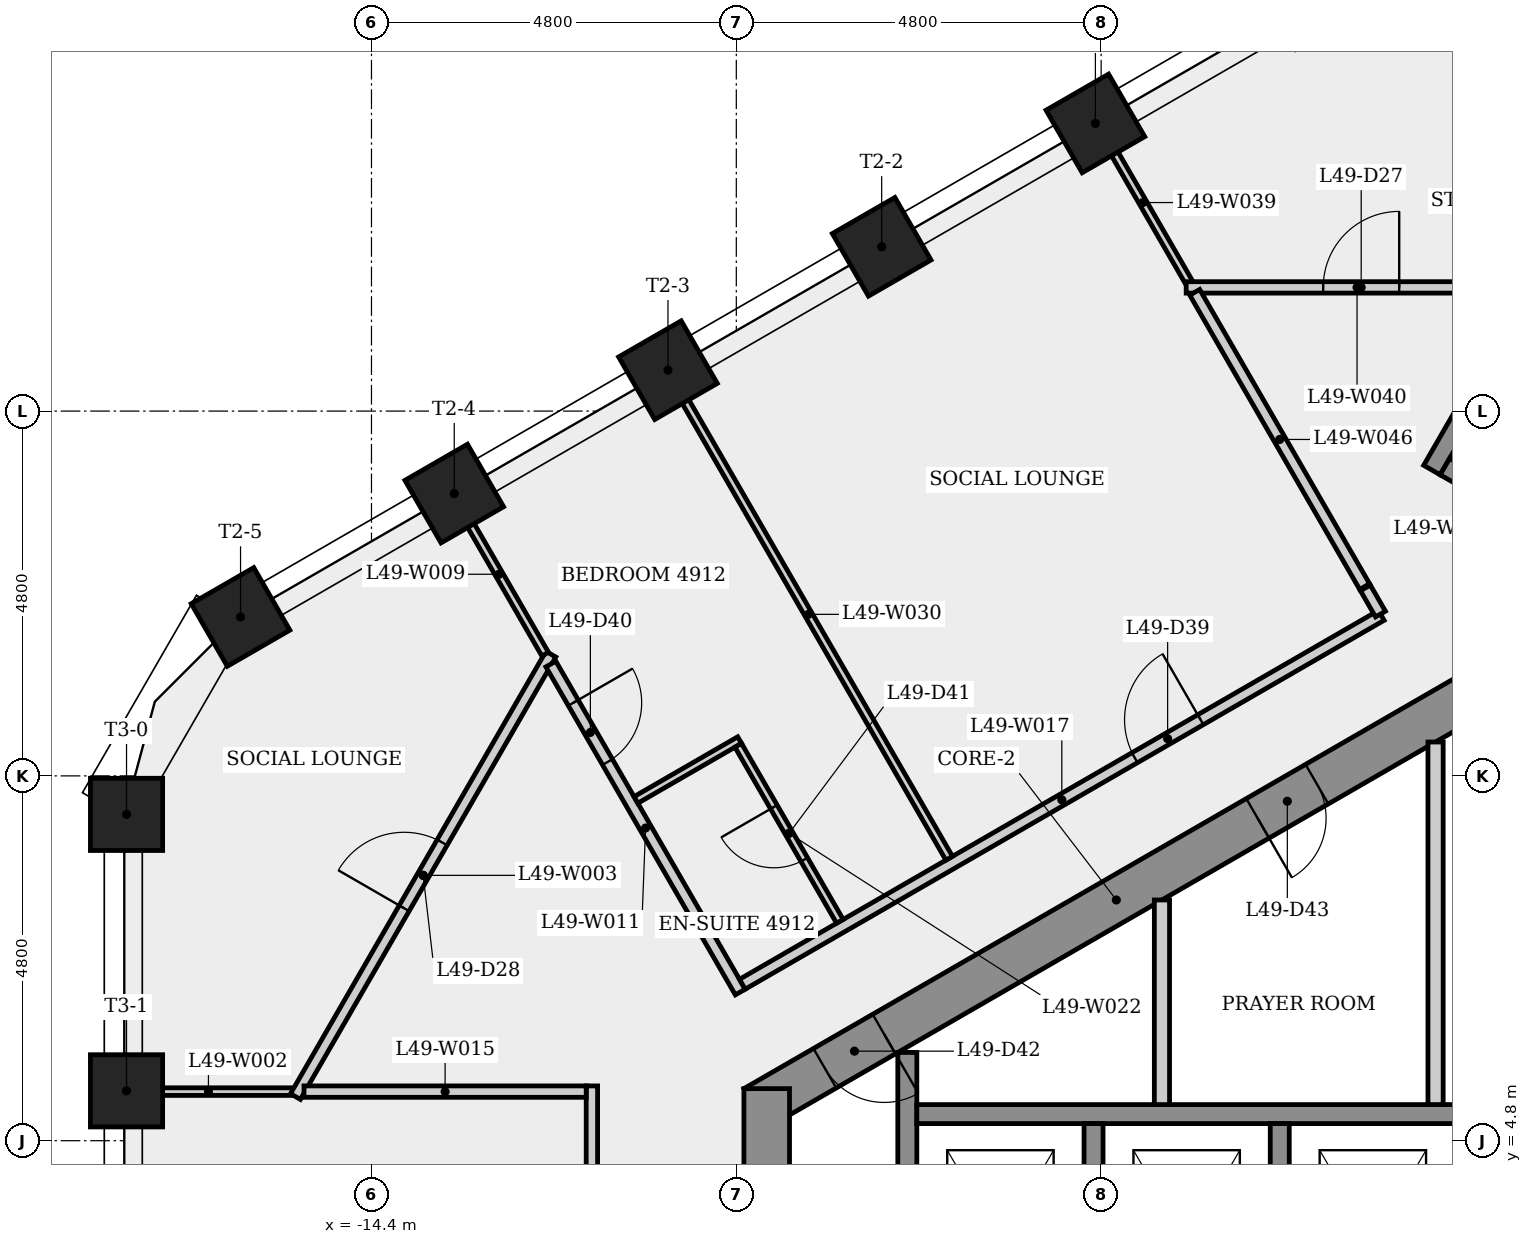
"""IFC4 building model, lengths in metres.
Left out: names, types, materials, properties, quantities, classifications, styles, units other than length and angle.
Written with IfcOpenShell. Run it as: python <this file> out.ifc"""

import sys

from ifc_helpers import new_model, si_unit, direction, frame, frame_2d, origin, origin_2d, place, context, subcontext, project, spatial, rectangle, extrude, element, fill, save


model = new_model("IFC4")
c1 = context("Model", 3, precision=1e-05, world=origin(), true_north=direction((0.0, 1.0)))
c2 = subcontext(c1, "Body", "Model", "MODEL_VIEW")
j1 = project(units=[si_unit("LENGTHUNIT", "METRE"), si_unit("PLANEANGLEUNIT", "RADIAN")], contexts=[c1])
p1 = place(None, origin())
s1 = spatial("IfcSite", under=j1, at=p1, CompositionType="ELEMENT")
p2 = place(p1, origin())
s2 = spatial("IfcBuilding", under=s1, at=p2, CompositionType="ELEMENT")
p3 = place(p2, frame((0.0, 0.0, 183.3)))
s3 = spatial("IfcBuildingStorey", under=s2, at=p3, CompositionType="ELEMENT", Elevation=183.3)
p4 = place(p3, frame((9.35, 5.225, 0.0), z_axis=(0.0, 0.0, 1.0), x_axis=(-0.866023993627, 0.500002442456, 0.0)))
e1 = element("IfcWall", 1, at=p4, inside=s3, PredefinedType="SHEAR", context=c2, shape_type="SweptSolid", body=[
    extrude(rectangle(XDim=10.97, YDim=0.6, at=frame_2d((5.485, 0.0))), origin(), (0.0, 0.0, 1.0), 3.4),
])
p5 = place(p4, frame((8.325, 0.0, 0.0)))
e2 = element("IfcOpeningElement", 2, at=p5, cuts=e1, PredefinedType="OPENING", context=c2, shape_type="SweptSolid", body=[
    extrude(rectangle(XDim=0.9, YDim=2.1, at=frame_2d((0.45, 1.05))), frame((0.0, 0.31, 0.0), z_axis=(0.0, -1.0, 0.0), x_axis=(1.0, 0.0, 0.0)), (0.0, 0.0, 1.0), 0.62),
])
p6 = place(p4, frame((1.518, 0.0, 0.0)))
e3 = element("IfcOpeningElement", 3, at=p6, cuts=e1, PredefinedType="OPENING", context=c2, shape_type="SweptSolid", body=[
    extrude(rectangle(XDim=0.9, YDim=2.1, at=frame_2d((0.45, 1.05))), frame((0.0, 0.31, 0.0), z_axis=(0.0, -1.0, 0.0), x_axis=(1.0, 0.0, 0.0)), (0.0, 0.0, 1.0), 0.62),
])
p7 = place(p3, frame((0.15, 10.71, 0.0), z_axis=(0.0, 0.0, 1.0), x_axis=(-0.866023993627, -0.500002442456, 0.0)))
e4 = element("IfcWall", 4, at=p7, inside=s3, PredefinedType="SHEAR", context=c2, shape_type="SweptSolid", body=[
    extrude(rectangle(XDim=10.97, YDim=0.6, at=frame_2d((5.485, 0.0))), origin(), (0.0, 0.0, 1.0), 3.4),
])
p8 = place(p7, frame((9.013, 0.0, 0.0)))
e5 = element("IfcOpeningElement", 5, at=p8, cuts=e4, PredefinedType="OPENING", context=c2, shape_type="SweptSolid", body=[
    extrude(rectangle(XDim=0.9, YDim=2.1, at=frame_2d((0.45, 1.05))), frame((0.0, 0.31, 0.0), z_axis=(0.0, -1.0, 0.0), x_axis=(1.0, 0.0, 0.0)), (0.0, 0.0, 1.0), 0.62),
])
p9 = place(p7, frame((2.437, 0.0, 0.0)))
e6 = element("IfcOpeningElement", 6, at=p9, cuts=e4, PredefinedType="OPENING", context=c2, shape_type="SweptSolid", body=[
    extrude(rectangle(XDim=0.9, YDim=2.1, at=frame_2d((0.45, 1.05))), frame((0.0, 0.31, 0.0), z_axis=(0.0, -1.0, 0.0), x_axis=(1.0, 0.0, 0.0)), (0.0, 0.0, 1.0), 0.62),
])
p10 = place(p3, frame((-9.2, 5.485, 0.0), z_axis=(0.0, 0.0, 1.0), x_axis=(0.0, -1.0, 0.0)))
e7 = element("IfcWall", 7, at=p10, inside=s3, PredefinedType="SHEAR", context=c2, shape_type="SweptSolid", body=[
    extrude(rectangle(XDim=10.97, YDim=0.6, at=frame_2d((5.485, 0.0))), origin(), (0.0, 0.0, 1.0), 3.4),
])
p11 = place(p10, frame((8.516, 0.0, 0.0)))
e8 = element("IfcOpeningElement", 8, at=p11, cuts=e7, PredefinedType="OPENING", context=c2, shape_type="SweptSolid", body=[
    extrude(rectangle(XDim=0.9, YDim=2.1, at=frame_2d((0.45, 1.05))), frame((0.0, 0.31, 0.0), z_axis=(0.0, -1.0, 0.0), x_axis=(1.0, 0.0, 0.0)), (0.0, 0.0, 1.0), 0.62),
])
p12 = place(p10, frame((4.685, 0.0, 0.0)))
e9 = element("IfcOpeningElement", 9, at=p12, cuts=e7, PredefinedType="OPENING", context=c2, shape_type="SweptSolid", body=[
    extrude(rectangle(XDim=1.6, YDim=2.1, at=frame_2d((0.8, 1.05))), frame((0.0, 0.31, 0.0), z_axis=(0.0, -1.0, 0.0), x_axis=(1.0, 0.0, 0.0)), (0.0, 0.0, 1.0), 0.62),
])
for number, where, z_axis, x_axis in (
    (10, (-4.875, 18.185, 0.0), (0.0, 0.0, 1.0), (-0.5, 0.866, 0.0)),
    (11, (-7.687, 16.562, 0.0), (0.0, 0.0, 1.0), (-0.5, 0.866, 0.0)),
    (12, (-10.499, 14.938, 0.0), (0.0, 0.0, 1.0), (-0.5, 0.866, 0.0)),
    (13, (-13.311, 13.315, 0.0), (0.0, 0.0, 1.0), (-0.5, 0.866, 0.0)),
    (14, (-16.123, 11.692, 0.0), (0.0, 0.0, 1.0), (-0.5, 0.866, 0.0)),
    (15, (-17.623, 9.094, 0.0), (0.0, 0.0, 1.0), (-1.0, 0.0, 0.0)),
    (16, (-17.623, 5.456, 0.0), (0.0, 0.0, 1.0), (-1.0, 0.0, 0.0)),
):
    element("IfcColumn", number, at=place(p3, frame(where, z_axis=z_axis, x_axis=x_axis)), inside=s3, PredefinedType="COLUMN", context=c2, shape_type="SweptSolid", body=[
        extrude(rectangle(XDim=0.95, YDim=0.95, at=origin_2d()), origin(), (0.0, 0.0, 1.0), 3.4),
    ])
p13 = place(p3, frame((-15.438, 5.446, 0.0), z_axis=(0.0, 0.0, 1.0), x_axis=(-1.0, 0.0, 0.0)))
e17 = element("IfcWall", 17, at=p13, inside=s3, PredefinedType="PARTITIONING", context=c2, shape_type="SweptSolid", body=[
    extrude(rectangle(XDim=2.214, YDim=0.1, at=frame_2d((1.107, 0.0))), origin(), (0.0, 0.0, 1.0), 3.0),
])
p14 = place(p3, frame((-15.4, 5.381, 0.0), z_axis=(0.0, 0.0, 1.0), x_axis=(0.49997922879, 0.866037395716, 0.0)))
e18 = element("IfcWall", 18, at=p14, inside=s3, PredefinedType="PARTITIONING", context=c2, shape_type="SweptSolid", body=[
    extrude(rectangle(XDim=6.721, YDim=0.15, at=frame_2d((3.361, 0.0))), origin(), (0.0, 0.0, 1.0), 3.0),
])
p15 = place(p14, frame((2.861, 0.0, 0.0)))
e19 = element("IfcOpeningElement", 19, at=p15, cuts=e18, PredefinedType="OPENING", context=c2, shape_type="SweptSolid", body=[
    extrude(rectangle(XDim=1.0, YDim=2.1, at=frame_2d((0.5, 1.05))), frame((0.0, 0.085, 0.0), z_axis=(0.0, -1.0, 0.0), x_axis=(1.0, 0.0, 0.0)), (0.0, 0.0, 1.0), 0.17),
])
p16 = place(p3, frame((-13.329, 13.305, 0.0), z_axis=(0.0, 0.0, 1.0), x_axis=(0.500021275498, -0.866013120021, 0.0)))
e20 = element("IfcWall", 20, at=p16, inside=s3, PredefinedType="PARTITIONING", context=c2, shape_type="SweptSolid", body=[
    extrude(rectangle(XDim=2.428, YDim=0.1, at=frame_2d((1.214, 0.0))), origin(), (0.0, 0.0, 1.0), 3.0),
])
p17 = place(p3, frame((-12.04, 11.072, 0.0), z_axis=(0.0, 0.0, 1.0), x_axis=(0.499985374448, -0.866033847686, 0.0)))
e21 = element("IfcWall", 21, at=p17, inside=s3, PredefinedType="PARTITIONING", context=c2, shape_type="SweptSolid", body=[
    extrude(rectangle(XDim=4.984, YDim=0.15, at=frame_2d((2.492, 0.0))), origin(), (0.0, 0.0, 1.0), 3.0),
])
p18 = place(p17, frame((0.589, 0.0, 0.0)))
e22 = element("IfcOpeningElement", 22, at=p18, cuts=e21, PredefinedType="OPENING", context=c2, shape_type="SweptSolid", body=[
    extrude(rectangle(XDim=0.9, YDim=2.1, at=frame_2d((0.45, 1.05))), frame((0.0, 0.085, 0.0), z_axis=(0.0, -1.0, 0.0), x_axis=(1.0, 0.0, 0.0)), (0.0, 0.0, 1.0), 0.17),
])
p19 = place(p3, frame((-11.5, -5.371, 0.0), z_axis=(0.0, 0.0, 1.0), x_axis=(0.0, 1.0, 0.0)))
e23 = element("IfcWall", 23, at=p19, inside=s3, PredefinedType="PARTITIONING", context=c2, shape_type="SweptSolid", body=[
    extrude(rectangle(XDim=10.892, YDim=0.15, at=frame_2d((5.446, 0.0))), origin(), (0.0, 0.0, 1.0), 3.0),
])
p20 = place(p19, frame((6.686, 0.0, 0.0)))
e24 = element("IfcOpeningElement", 24, at=p20, cuts=e23, PredefinedType="OPENING", context=c2, shape_type="SweptSolid", body=[
    extrude(rectangle(XDim=1.0, YDim=2.1, at=frame_2d((0.5, 1.05))), frame((0.0, 0.085, 0.0), z_axis=(0.0, -1.0, 0.0), x_axis=(1.0, 0.0, 0.0)), (0.0, 0.0, 1.0), 0.17),
])
p21 = place(p19, frame((2.256, 0.0, 0.0)))
e25 = element("IfcOpeningElement", 25, at=p21, cuts=e23, PredefinedType="OPENING", context=c2, shape_type="SweptSolid", body=[
    extrude(rectangle(XDim=0.9, YDim=2.1, at=frame_2d((0.45, 1.05))), frame((0.0, 0.085, 0.0), z_axis=(0.0, -1.0, 0.0), x_axis=(1.0, 0.0, 0.0)), (0.0, 0.0, 1.0), 0.17),
])
p22 = place(p3, frame((-11.575, 5.446, 0.0), z_axis=(0.0, 0.0, 1.0), x_axis=(-1.0, 0.0, 0.0)))
e26 = element("IfcWall", 26, at=p22, inside=s3, PredefinedType="PARTITIONING", context=c2, shape_type="SweptSolid", body=[
    extrude(rectangle(XDim=3.713, YDim=0.15, at=frame_2d((1.856, 0.0))), origin(), (0.0, 0.0, 1.0), 3.0),
])
p23 = place(p3, frame((-9.556, 10.071, 0.0), z_axis=(0.0, 0.0, 1.0), x_axis=(-0.866002311072, -0.500039995618, 0.0)))
e27 = element("IfcWall", 27, at=p23, inside=s3, PredefinedType="PARTITIONING", context=c2, shape_type="SweptSolid", body=[
    extrude(rectangle(XDim=1.575, YDim=0.1, at=frame_2d((0.788, 0.0))), origin(), (0.0, 0.0, 1.0), 3.0),
])
p24 = place(p3, frame((-9.521, 6.859, 0.0), z_axis=(0.0, 0.0, 1.0), x_axis=(0.866022649559, 0.500004770428, 0.0)))
e28 = element("IfcWall", 28, at=p24, inside=s3, PredefinedType="PARTITIONING", context=c2, shape_type="SweptSolid", body=[
    extrude(rectangle(XDim=9.707, YDim=0.15, at=frame_2d((4.853, 0.0))), origin(), (0.0, 0.0, 1.0), 3.0),
])
p25 = place(p24, frame((5.961, 0.0, 0.0)))
e29 = element("IfcOpeningElement", 29, at=p25, cuts=e28, PredefinedType="OPENING", context=c2, shape_type="SweptSolid", body=[
    extrude(rectangle(XDim=1.0, YDim=2.1, at=frame_2d((0.5, 1.05))), frame((0.0, 0.085, 0.0), z_axis=(0.0, -1.0, 0.0), x_axis=(1.0, 0.0, 0.0)), (0.0, 0.0, 1.0), 0.17),
])
p26 = place(p3, frame((-8.237, 7.686, 0.0), z_axis=(0.0, 0.0, 1.0), x_axis=(-0.499967368674, 0.86604424267, 0.0)))
e30 = element("IfcWall", 30, at=p26, inside=s3, PredefinedType="PARTITIONING", context=c2, shape_type="SweptSolid", body=[
    extrude(rectangle(XDim=2.675, YDim=0.1, at=frame_2d((1.337, 0.0))), origin(), (0.0, 0.0, 1.0), 3.0),
])
p27 = place(p26, frame((0.938, 0.0, 0.0)))
e31 = element("IfcOpeningElement", 31, at=p27, cuts=e30, PredefinedType="OPENING", context=c2, shape_type="SweptSolid", body=[
    extrude(rectangle(XDim=0.8, YDim=2.1, at=frame_2d((0.4, 1.05))), frame((0.0, 0.06, 0.0), z_axis=(0.0, -1.0, 0.0), x_axis=(1.0, 0.0, 0.0)), (0.0, 0.0, 1.0), 0.12),
])
p28 = place(p3, frame((-7.35, 1.925, 0.0), z_axis=(0.0, 0.0, 1.0), x_axis=(0.0, 1.0, 0.0)))
e32 = element("IfcWall", 32, at=p28, inside=s3, PredefinedType="SHEAR", context=c2, shape_type="SweptSolid", body=[
    extrude(rectangle(XDim=4.036, YDim=0.25, at=frame_2d((2.018, 0.0))), origin(), (0.0, 0.0, 1.0), 3.0),
])
p29 = place(p3, frame((-7.225, 5.15, 0.0), z_axis=(0.0, 0.0, 1.0), x_axis=(1.0, 0.0, 0.0)))
e33 = element("IfcWall", 33, at=p29, inside=s3, PredefinedType="SHEAR", context=c2, shape_type="SweptSolid", body=[
    extrude(rectangle(XDim=14.7, YDim=0.25, at=frame_2d((7.35, 0.0))), origin(), (0.0, 0.0, 1.0), 3.0),
])
p30 = place(p3, frame((-6.799, 8.516, 0.0), z_axis=(0.0, 0.0, 1.0), x_axis=(-0.500011399757, 0.866018822032, 0.0)))
e34 = element("IfcWall", 34, at=p30, inside=s3, PredefinedType="PARTITIONING", context=c2, shape_type="SweptSolid", body=[
    extrude(rectangle(XDim=7.411, YDim=0.1, at=frame_2d((3.706, 0.0))), origin(), (0.0, 0.0, 1.0), 3.0),
])
p31 = place(p3, frame((-4.9, 5.025, 0.0), z_axis=(0.0, 0.0, 1.0), x_axis=(0.0, -1.0, 0.0)))
e35 = element("IfcWall", 35, at=p31, inside=s3, PredefinedType="SHEAR", context=c2, shape_type="SweptSolid", body=[
    extrude(rectangle(XDim=3.1, YDim=0.25, at=frame_2d((1.55, 0.0))), origin(), (0.0, 0.0, 1.0), 3.4),
])
p32 = place(p3, frame((-4.0, 7.967, 0.0), z_axis=(0.0, 0.0, 1.0), x_axis=(0.0, -1.0, 0.0)))
e36 = element("IfcWall", 36, at=p32, inside=s3, PredefinedType="PARTITIONING", context=c2, shape_type="SweptSolid", body=[
    extrude(rectangle(XDim=2.692, YDim=0.2, at=frame_2d((1.346, 0.0))), origin(), (0.0, 0.0, 1.0), 3.0),
])
p33 = place(p3, frame((-3.644, 16.093, 0.0), z_axis=(0.0, 0.0, 1.0), x_axis=(-0.500021275498, 0.866013120021, 0.0)))
e37 = element("IfcWall", 37, at=p33, inside=s3, PredefinedType="PARTITIONING", context=c2, shape_type="SweptSolid", body=[
    extrude(rectangle(XDim=2.428, YDim=0.1, at=frame_2d((1.214, 0.0))), origin(), (0.0, 0.0, 1.0), 3.0),
])
p34 = place(p3, frame((-3.681, 16.028, 0.0), z_axis=(0.0, 0.0, 1.0), x_axis=(1.0, 0.0, 0.0)))
e38 = element("IfcWall", 38, at=p34, inside=s3, PredefinedType="PARTITIONING", context=c2, shape_type="SweptSolid", body=[
    extrude(rectangle(XDim=4.496, YDim=0.15, at=frame_2d((2.248, 0.0))), origin(), (0.0, 0.0, 1.0), 3.0),
])
p35 = place(p34, frame((1.803, 0.0, 0.0)))
e39 = element("IfcOpeningElement", 39, at=p35, cuts=e38, PredefinedType="OPENING", context=c2, shape_type="SweptSolid", body=[
    extrude(rectangle(XDim=1.0, YDim=2.1, at=frame_2d((0.5, 1.05))), frame((0.0, 0.085, 0.0), z_axis=(0.0, -1.0, 0.0), x_axis=(1.0, 0.0, 0.0)), (0.0, 0.0, 1.0), 0.17),
])
p36 = place(p3, frame((-2.45, 5.025, 0.0), z_axis=(0.0, 0.0, 1.0), x_axis=(0.0, -1.0, 0.0)))
e40 = element("IfcWall", 40, at=p36, inside=s3, PredefinedType="SHEAR", context=c2, shape_type="SweptSolid", body=[
    extrude(rectangle(XDim=3.1, YDim=0.25, at=frame_2d((1.55, 0.0))), origin(), (0.0, 0.0, 1.0), 3.4),
])
p37 = place(p3, frame((-1.333, 12.091, 0.0), z_axis=(0.0, 0.0, 1.0), x_axis=(-0.499991893987, 0.866030083742, 0.0)))
e41 = element("IfcWall", 41, at=p37, inside=s3, PredefinedType="PARTITIONING", context=c2, shape_type="SweptSolid", body=[
    extrude(rectangle(XDim=4.471, YDim=0.15, at=frame_2d((2.235, 0.0))), origin(), (0.0, 0.0, 1.0), 3.0),
])
p38 = place(p3, frame((-1.323, 12.073, 0.0), z_axis=(0.0, 0.0, 1.0), x_axis=(0.4999705729, -0.866042392862, 0.0)))
e42 = element("IfcWall", 42, at=p38, inside=s3, PredefinedType="PARTITIONING", context=c2, shape_type="SweptSolid", body=[
    extrude(rectangle(XDim=0.397, YDim=0.15, at=frame_2d((0.199, 0.0))), origin(), (0.0, 0.0, 1.0), 3.0),
])
p39 = place(p3, frame((-0.4, 10.046, 0.0), z_axis=(0.0, 0.0, 1.0), x_axis=(0.0, -1.0, 0.0)))
e43 = element("IfcWall", 43, at=p39, inside=s3, PredefinedType="PARTITIONING", context=c2, shape_type="SweptSolid", body=[
    extrude(rectangle(XDim=4.771, YDim=0.2, at=frame_2d((2.385, 0.0))), origin(), (0.0, 0.0, 1.0), 3.0),
])
p40 = place(p3, frame((-0.448, 13.624, 0.0), z_axis=(0.0, 0.0, 1.0), x_axis=(0.500037662692, 0.866003658127, 0.0)))
e44 = element("IfcWall", 44, at=p40, inside=s3, PredefinedType="SHEAR", context=c2, shape_type="SweptSolid", body=[
    extrude(rectangle(XDim=2.95, YDim=0.25, at=frame_2d((1.475, 0.0))), origin(), (0.0, 0.0, 1.0), 3.0),
])
p41 = place(p3, frame((2.581, 12.02, 0.0), z_axis=(0.0, 0.0, 1.0), x_axis=(-0.866040211805, 0.499974350878, 0.0)))
e45 = element("IfcWall", 45, at=p41, inside=s3, PredefinedType="SHEAR", context=c2, shape_type="SweptSolid", body=[
    extrude(rectangle(XDim=3.3, YDim=0.25, at=frame_2d((1.65, 0.0))), origin(), (0.0, 0.0, 1.0), 3.0),
])
p42 = place(p35, origin())
e46 = element("IfcDoor", 46, at=p42, inside=s3, OperationType="SINGLE_SWING_RIGHT", PredefinedType="DOOR", context=c2, shape_type="SweptSolid", body=[
    extrude(rectangle(XDim=1.0, YDim=2.1, at=frame_2d((0.5, 1.05))), frame((0.0, 0.025, 0.0), z_axis=(0.0, -1.0, 0.0), x_axis=(1.0, 0.0, 0.0)), (0.0, 0.0, 1.0), 0.05),
])
fill(e39, e46)
p43 = place(p15, origin())
e47 = element("IfcDoor", 47, at=p43, inside=s3, OperationType="SINGLE_SWING_LEFT", PredefinedType="DOOR", context=c2, shape_type="SweptSolid", body=[
    extrude(rectangle(XDim=1.0, YDim=2.1, at=frame_2d((0.5, 1.05))), frame((0.0, 0.025, 0.0), z_axis=(0.0, -1.0, 0.0), x_axis=(1.0, 0.0, 0.0)), (0.0, 0.0, 1.0), 0.05),
])
fill(e19, e47)
p44 = place(p25, origin())
e48 = element("IfcDoor", 48, at=p44, inside=s3, OperationType="SINGLE_SWING_RIGHT", PredefinedType="DOOR", context=c2, shape_type="SweptSolid", body=[
    extrude(rectangle(XDim=1.0, YDim=2.1, at=frame_2d((0.5, 1.05))), frame((0.0, 0.025, 0.0), z_axis=(0.0, -1.0, 0.0), x_axis=(1.0, 0.0, 0.0)), (0.0, 0.0, 1.0), 0.05),
])
fill(e29, e48)
p45 = place(p18, origin())
e49 = element("IfcDoor", 49, at=p45, inside=s3, OperationType="SINGLE_SWING_LEFT", PredefinedType="DOOR", context=c2, shape_type="SweptSolid", body=[
    extrude(rectangle(XDim=0.9, YDim=2.1, at=frame_2d((0.45, 1.05))), frame((0.0, 0.025, 0.0), z_axis=(0.0, -1.0, 0.0), x_axis=(1.0, 0.0, 0.0)), (0.0, 0.0, 1.0), 0.05),
])
fill(e22, e49)
p46 = place(p27, origin())
e50 = element("IfcDoor", 50, at=p46, inside=s3, OperationType="SINGLE_SWING_RIGHT", PredefinedType="DOOR", context=c2, shape_type="SweptSolid", body=[
    extrude(rectangle(XDim=0.8, YDim=2.1, at=frame_2d((0.4, 1.05))), frame((0.0, 0.025, 0.0), z_axis=(0.0, -1.0, 0.0), x_axis=(1.0, 0.0, 0.0)), (0.0, 0.0, 1.0), 0.05),
])
fill(e31, e50)
p47 = place(p8, origin())
e51 = element("IfcDoor", 51, at=p47, inside=s3, OperationType="SINGLE_SWING_LEFT", PredefinedType="DOOR", context=c2, shape_type="SweptSolid", body=[
    extrude(rectangle(XDim=0.9, YDim=2.1, at=frame_2d((0.45, 1.05))), frame((0.0, 0.025, 0.0), z_axis=(0.0, -1.0, 0.0), x_axis=(1.0, 0.0, 0.0)), (0.0, 0.0, 1.0), 0.05),
])
fill(e5, e51)
p48 = place(p9, origin())
e52 = element("IfcDoor", 52, at=p48, inside=s3, OperationType="SINGLE_SWING_RIGHT", PredefinedType="DOOR", context=c2, shape_type="SweptSolid", body=[
    extrude(rectangle(XDim=0.9, YDim=2.1, at=frame_2d((0.45, 1.05))), frame((0.0, 0.025, 0.0), z_axis=(0.0, -1.0, 0.0), x_axis=(1.0, 0.0, 0.0)), (0.0, 0.0, 1.0), 0.05),
])
fill(e6, e52)
save(model, sys.argv[1])
